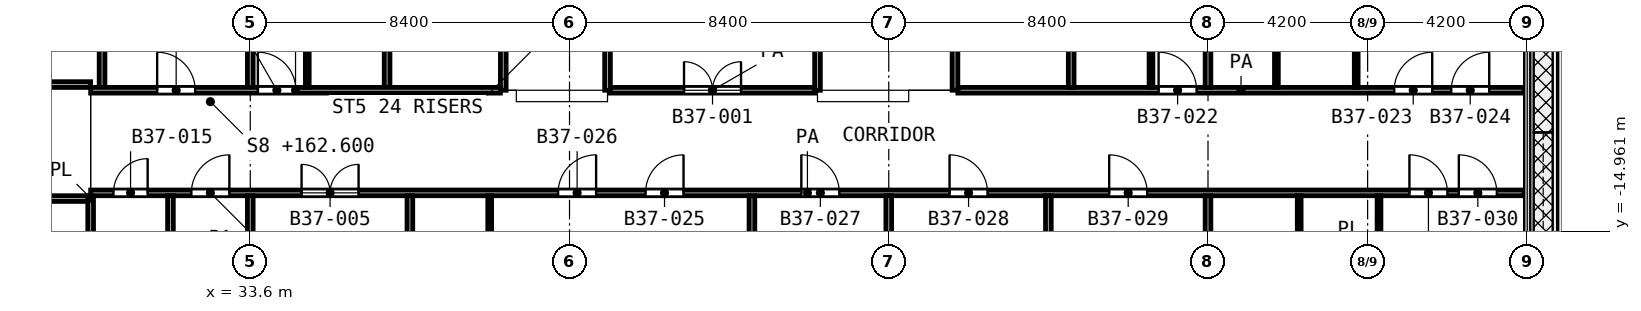
"""IFC4 building model, lengths in metres.
Left out: names, types, materials, properties, quantities, classifications, styles, units other than length and angle.
Written with IfcOpenShell. Run it as: python <this file> out.ifc"""

import sys

from ifc_helpers import new_model, si_unit, direction, frame, frame_2d, origin, place, context, subcontext, project, spatial, rectangle, extrude, element, fill, save


model = new_model("IFC4")
c1 = context("Model", 3, precision=1e-05, world=origin(), true_north=direction((0.0, 1.0)))
c2 = subcontext(c1, "Body", "Model", "MODEL_VIEW")
j1 = project(units=[si_unit("LENGTHUNIT", "METRE"), si_unit("PLANEANGLEUNIT", "RADIAN")], contexts=[c1])
p1 = place(None, origin())
s1 = spatial("IfcSite", under=j1, at=p1, CompositionType="ELEMENT")
p2 = place(p1, origin())
s2 = spatial("IfcBuilding", under=s1, at=p2, CompositionType="ELEMENT")
p3 = place(p2, frame((0.0, 0.0, 162.6)))
s3 = spatial("IfcBuildingStorey", under=s2, at=p3, CompositionType="ELEMENT", Elevation=162.6)
p4 = place(p3, frame((29.4, -14.147, 0.0), z_axis=(0.0, 0.0, 1.0), x_axis=(0.0, 1.0, 0.0)))
e1 = element("IfcWall", 1, at=p4, inside=s3, PredefinedType="PARTITIONING", context=c2, shape_type="SweptSolid", body=[
    extrude(rectangle(XDim=0.12, YDim=0.1, at=frame_2d((0.06, 0.0))), origin(), (0.0, 0.0, 1.0), 3.6),
])
for number, where, z_axis, x_axis in (
    (2, (35.1, -11.175, 0.0), (0.0, 0.0, 1.0), (0.0, 1.0, 0.0)),
    (3, (39.9, -17.25, 0.0), (0.0, 0.0, 1.0), (0.0, 1.0, 0.0)),
    (4, (57.3, -11.175, 0.0), (0.0, 0.0, 1.0), (0.0, 1.0, 0.0)),
):
    element("IfcWall", number, at=place(p3, frame(where, z_axis=z_axis, x_axis=x_axis)), inside=s3, PredefinedType="PARTITIONING", context=c2, shape_type="SweptSolid", body=[
        extrude(rectangle(XDim=3.225, YDim=0.1, at=frame_2d((1.613, 0.0))), origin(), (0.0, 0.0, 1.0), 3.6),
    ])
for number, where, z_axis, x_axis in (
    (5, (60.6, -11.175, 0.0), (0.0, 0.0, 1.0), (0.0, 1.0, 0.0)),
    (6, (61.2, -17.248, 0.0), (0.0, 0.0, 1.0), (0.0, 1.0, 0.0)),
    (7, (62.7, -11.175, 0.0), (0.0, 0.0, 1.0), (0.0, 1.0, 0.0)),
):
    element("IfcWall", number, at=place(p3, frame(where, z_axis=z_axis, x_axis=x_axis)), inside=s3, PredefinedType="PARTITIONING", context=c2, shape_type="SweptSolid", body=[
        extrude(rectangle(XDim=3.223, YDim=0.1, at=frame_2d((1.612, 0.0))), origin(), (0.0, 0.0, 1.0), 3.6),
    ])
p5 = place(p3, frame((63.3, -17.249, 0.0), z_axis=(0.0, 0.0, 1.0), x_axis=(0.0, 1.0, 0.0)))
e8 = element("IfcWall", 8, at=p5, inside=s3, PredefinedType="PARTITIONING", context=c2, shape_type="SweptSolid", body=[
    extrude(rectangle(XDim=3.224, YDim=0.1, at=frame_2d((1.612, 0.0))), origin(), (0.0, 0.0, 1.0), 3.6),
])
p6 = place(p3, frame((24.9, -14.1, 0.0), z_axis=(0.0, 0.0, 1.0), x_axis=(1.0, 0.0, 0.0)))
e9 = element("IfcWall", 9, at=p6, inside=s3, PredefinedType="PARTITIONING", context=c2, shape_type="SweptSolid", body=[
    extrude(rectangle(XDim=4.425, YDim=0.15, at=frame_2d((2.212, 0.0))), origin(), (0.0, 0.0, 1.0), 3.6),
])
p7 = place(p6, frame((1.9, 0.0, 0.0)))
e10 = element("IfcOpeningElement", 10, at=p7, cuts=e9, PredefinedType="OPENING", context=c2, shape_type="SweptSolid", body=[
    extrude(rectangle(XDim=1.0, YDim=2.1, at=frame_2d((0.5, 1.05))), frame((0.0, 0.085, 0.0), z_axis=(0.0, -1.0, 0.0), x_axis=(1.0, 0.0, 0.0)), (0.0, 0.0, 1.0), 0.17),
])
p8 = place(p3, frame((29.4, -13.95, 0.0), z_axis=(0.0, 0.0, 1.0), x_axis=(1.0, 0.0, 0.0)))
e11 = element("IfcWall", 11, at=p8, inside=s3, PredefinedType="PARTITIONING", context=c2, shape_type="SweptSolid", body=[
    extrude(rectangle(XDim=37.72, YDim=0.15, at=frame_2d((18.86, 0.0))), origin(), (0.0, 0.0, 1.0), 3.6),
])
p9 = place(p8, frame((14.6, 0.0, 0.0)))
e12 = element("IfcOpeningElement", 12, at=p9, cuts=e11, PredefinedType="OPENING", context=c2, shape_type="SweptSolid", body=[
    extrude(rectangle(XDim=1.0, YDim=2.1, at=frame_2d((0.5, 1.05))), frame((0.0, 0.085, 0.0), z_axis=(0.0, -1.0, 0.0), x_axis=(1.0, 0.0, 0.0)), (0.0, 0.0, 1.0), 0.17),
])
p10 = place(p8, frame((12.3, 0.0, 0.0)))
e13 = element("IfcOpeningElement", 13, at=p10, cuts=e11, PredefinedType="OPENING", context=c2, shape_type="SweptSolid", body=[
    extrude(rectangle(XDim=1.0, YDim=2.1, at=frame_2d((0.5, 1.05))), frame((0.0, 0.085, 0.0), z_axis=(0.0, -1.0, 0.0), x_axis=(1.0, 0.0, 0.0)), (0.0, 0.0, 1.0), 0.17),
])
p11 = place(p8, frame((18.7, 0.0, 0.0)))
e14 = element("IfcOpeningElement", 14, at=p11, cuts=e11, PredefinedType="OPENING", context=c2, shape_type="SweptSolid", body=[
    extrude(rectangle(XDim=1.0, YDim=2.1, at=frame_2d((0.5, 1.05))), frame((0.0, 0.085, 0.0), z_axis=(0.0, -1.0, 0.0), x_axis=(1.0, 0.0, 0.0)), (0.0, 0.0, 1.0), 0.17),
])
p12 = place(p8, frame((22.6, 0.0, 0.0)))
e15 = element("IfcOpeningElement", 15, at=p12, cuts=e11, PredefinedType="OPENING", context=c2, shape_type="SweptSolid", body=[
    extrude(rectangle(XDim=1.0, YDim=2.1, at=frame_2d((0.5, 1.05))), frame((0.0, 0.085, 0.0), z_axis=(0.0, -1.0, 0.0), x_axis=(1.0, 0.0, 0.0)), (0.0, 0.0, 1.0), 0.17),
])
p13 = place(p8, frame((26.8, 0.0, 0.0)))
e16 = element("IfcOpeningElement", 16, at=p13, cuts=e11, PredefinedType="OPENING", context=c2, shape_type="SweptSolid", body=[
    extrude(rectangle(XDim=1.0, YDim=2.1, at=frame_2d((0.5, 1.05))), frame((0.0, 0.085, 0.0), z_axis=(0.0, -1.0, 0.0), x_axis=(1.0, 0.0, 0.0)), (0.0, 0.0, 1.0), 0.17),
])
p14 = place(p8, frame((36.0, 0.0, 0.0)))
e17 = element("IfcOpeningElement", 17, at=p14, cuts=e11, PredefinedType="OPENING", context=c2, shape_type="SweptSolid", body=[
    extrude(rectangle(XDim=1.0, YDim=2.1, at=frame_2d((0.5, 1.05))), frame((0.0, 0.085, 0.0), z_axis=(0.0, -1.0, 0.0), x_axis=(1.0, 0.0, 0.0)), (0.0, 0.0, 1.0), 0.17),
])
p15 = place(p8, frame((34.7, 0.0, 0.0)))
e18 = element("IfcOpeningElement", 18, at=p15, cuts=e11, PredefinedType="OPENING", context=c2, shape_type="SweptSolid", body=[
    extrude(rectangle(XDim=1.0, YDim=2.1, at=frame_2d((0.5, 1.05))), frame((0.0, 0.085, 0.0), z_axis=(0.0, -1.0, 0.0), x_axis=(1.0, 0.0, 0.0)), (0.0, 0.0, 1.0), 0.17),
])
p16 = place(p8, frame((0.6, 0.0, 0.0)))
e19 = element("IfcOpeningElement", 19, at=p16, cuts=e11, PredefinedType="OPENING", context=c2, shape_type="SweptSolid", body=[
    extrude(rectangle(XDim=0.9, YDim=2.1, at=frame_2d((0.45, 1.05))), frame((0.0, 0.085, 0.0), z_axis=(0.0, -1.0, 0.0), x_axis=(1.0, 0.0, 0.0)), (0.0, 0.0, 1.0), 0.17),
])
p17 = place(p8, frame((2.65, 0.0, 0.0)))
e20 = element("IfcOpeningElement", 20, at=p17, cuts=e11, PredefinedType="OPENING", context=c2, shape_type="SweptSolid", body=[
    extrude(rectangle(XDim=1.0, YDim=2.1, at=frame_2d((0.5, 1.05))), frame((0.0, 0.085, 0.0), z_axis=(0.0, -1.0, 0.0), x_axis=(1.0, 0.0, 0.0)), (0.0, 0.0, 1.0), 0.17),
])
p18 = place(p8, frame((5.55, 0.0, 0.0)))
e21 = element("IfcOpeningElement", 21, at=p18, cuts=e11, PredefinedType="OPENING", context=c2, shape_type="SweptSolid", body=[
    extrude(rectangle(XDim=1.5, YDim=2.1, at=frame_2d((0.75, 1.05))), frame((0.0, 0.085, 0.0), z_axis=(0.0, -1.0, 0.0), x_axis=(1.0, 0.0, 0.0)), (0.0, 0.0, 1.0), 0.17),
])
p19 = place(p3, frame((29.4, -11.25, 0.0), z_axis=(0.0, 0.0, 1.0), x_axis=(1.0, 0.0, 0.0)))
e22 = element("IfcWall", 22, at=p19, inside=s3, PredefinedType="PARTITIONING", context=c2, shape_type="SweptSolid", body=[
    extrude(rectangle(XDim=10.782, YDim=0.15, at=frame_2d((5.391, 0.0))), origin(), (0.0, 0.0, 1.0), 3.6),
])
p20 = place(p19, frame((1.75, 0.0, 0.0)))
e23 = element("IfcOpeningElement", 23, at=p20, cuts=e22, PredefinedType="OPENING", context=c2, shape_type="SweptSolid", body=[
    extrude(rectangle(XDim=1.0, YDim=2.1, at=frame_2d((0.5, 1.05))), frame((0.0, 0.085, 0.0), z_axis=(0.0, -1.0, 0.0), x_axis=(1.0, 0.0, 0.0)), (0.0, 0.0, 1.0), 0.17),
])
p21 = place(p19, frame((4.4, 0.0, 0.0)))
e24 = element("IfcOpeningElement", 24, at=p21, cuts=e22, PredefinedType="OPENING", context=c2, shape_type="SweptSolid", body=[
    extrude(rectangle(XDim=1.0, YDim=2.1, at=frame_2d((0.5, 1.05))), frame((0.0, 0.085, 0.0), z_axis=(0.0, -1.0, 0.0), x_axis=(1.0, 0.0, 0.0)), (0.0, 0.0, 1.0), 0.17),
])
p22 = place(p3, frame((43.075, -11.25, 0.0), z_axis=(0.0, 0.0, 1.0), x_axis=(1.0, 0.0, 0.0)))
e25 = element("IfcWall", 25, at=p22, inside=s3, PredefinedType="PARTITIONING", context=c2, shape_type="SweptSolid", body=[
    extrude(rectangle(XDim=5.375, YDim=0.15, at=frame_2d((2.688, 0.0))), origin(), (0.0, 0.0, 1.0), 3.6),
])
p23 = place(p22, frame((1.938, 0.0, 0.0)))
e26 = element("IfcOpeningElement", 26, at=p23, cuts=e25, PredefinedType="OPENING", context=c2, shape_type="SweptSolid", body=[
    extrude(rectangle(XDim=1.5, YDim=2.1, at=frame_2d((0.75, 1.05))), frame((0.0, 0.085, 0.0), z_axis=(0.0, -1.0, 0.0), x_axis=(1.0, 0.0, 0.0)), (0.0, 0.0, 1.0), 0.17),
])
p24 = place(p3, frame((52.218, -11.25, 0.0), z_axis=(0.0, 0.0, 1.0), x_axis=(1.0, 0.0, 0.0)))
e27 = element("IfcWall", 27, at=p24, inside=s3, PredefinedType="PARTITIONING", context=c2, shape_type="SweptSolid", body=[
    extrude(rectangle(XDim=14.902, YDim=0.15, at=frame_2d((7.451, 0.0))), origin(), (0.0, 0.0, 1.0), 3.6),
])
p25 = place(p24, frame((5.282, 0.0, 0.0)))
e28 = element("IfcOpeningElement", 28, at=p25, cuts=e27, PredefinedType="OPENING", context=c2, shape_type="SweptSolid", body=[
    extrude(rectangle(XDim=1.0, YDim=2.1, at=frame_2d((0.5, 1.05))), frame((0.0, 0.085, 0.0), z_axis=(0.0, -1.0, 0.0), x_axis=(1.0, 0.0, 0.0)), (0.0, 0.0, 1.0), 0.17),
])
p26 = place(p24, frame((11.482, 0.0, 0.0)))
e29 = element("IfcOpeningElement", 29, at=p26, cuts=e27, PredefinedType="OPENING", context=c2, shape_type="SweptSolid", body=[
    extrude(rectangle(XDim=1.0, YDim=2.1, at=frame_2d((0.5, 1.05))), frame((0.0, 0.085, 0.0), z_axis=(0.0, -1.0, 0.0), x_axis=(1.0, 0.0, 0.0)), (0.0, 0.0, 1.0), 0.17),
])
p27 = place(p24, frame((12.982, 0.0, 0.0)))
e30 = element("IfcOpeningElement", 30, at=p27, cuts=e27, PredefinedType="OPENING", context=c2, shape_type="SweptSolid", body=[
    extrude(rectangle(XDim=1.0, YDim=2.1, at=frame_2d((0.5, 1.05))), frame((0.0, 0.085, 0.0), z_axis=(0.0, -1.0, 0.0), x_axis=(1.0, 0.0, 0.0)), (0.0, 0.0, 1.0), 0.17),
])
p28 = place(p3, frame((24.9, -11.1, 0.0), z_axis=(0.0, 0.0, 1.0), x_axis=(1.0, 0.0, 0.0)))
e31 = element("IfcWall", 31, at=p28, inside=s3, PredefinedType="PARTITIONING", context=c2, shape_type="SweptSolid", body=[
    extrude(rectangle(XDim=4.498, YDim=0.15, at=frame_2d((2.249, 0.0))), origin(), (0.0, 0.0, 1.0), 3.6),
])
p29 = place(p28, frame((1.799, 0.0, 0.0)))
e32 = element("IfcOpeningElement", 32, at=p29, cuts=e31, PredefinedType="OPENING", context=c2, shape_type="SweptSolid", body=[
    extrude(rectangle(XDim=1.2, YDim=2.1, at=frame_2d((0.6, 1.05))), frame((0.0, 0.085, 0.0), z_axis=(0.0, -1.0, 0.0), x_axis=(1.0, 0.0, 0.0)), (0.0, 0.0, 1.0), 0.17),
])
p30 = place(p3, frame((29.4, -31.198, 0.0), z_axis=(0.0, 0.0, 1.0), x_axis=(0.0, 1.0, 0.0)))
e33 = element("IfcWall", 33, at=p30, inside=s3, PredefinedType="PARTITIONING", context=c2, shape_type="SweptSolid", body=[
    extrude(rectangle(XDim=17.098, YDim=0.15, at=frame_2d((8.549, 0.0))), origin(), (0.0, 0.0, 1.0), 3.6),
])
p31 = place(p3, frame((29.7, -11.175, 0.0), z_axis=(0.0, 0.0, 1.0), x_axis=(0.0, 1.0, 0.0)))
e34 = element("IfcWall", 34, at=p31, inside=s3, PredefinedType="PARTITIONING", context=c2, shape_type="SweptSolid", body=[
    extrude(rectangle(XDim=11.095, YDim=0.15, at=frame_2d((5.547, 0.0))), origin(), (0.0, 0.0, 1.0), 2.7),
])
p32 = place(p3, frame((31.5, -24.698, 0.0), z_axis=(0.0, 0.0, 1.0), x_axis=(0.0, 1.0, 0.0)))
e35 = element("IfcWall", 35, at=p32, inside=s3, PredefinedType="PARTITIONING", context=c2, shape_type="SweptSolid", body=[
    extrude(rectangle(XDim=10.673, YDim=0.15, at=frame_2d((5.336, 0.0))), origin(), (0.0, 0.0, 1.0), 3.6),
])
p33 = place(p3, frame((33.6, -16.3, 0.0), z_axis=(0.0, 0.0, 1.0), x_axis=(0.0, 1.0, 0.0)))
e36 = element("IfcWall", 36, at=p33, inside=s3, PredefinedType="PARTITIONING", context=c2, shape_type="SweptSolid", body=[
    extrude(rectangle(XDim=2.275, YDim=0.15, at=frame_2d((1.138, 0.0))), origin(), (0.0, 0.0, 1.0), 3.6),
])
p34 = place(p3, frame((33.6, -11.175, 0.0), z_axis=(0.0, 0.0, 1.0), x_axis=(0.0, 1.0, 0.0)))
e37 = element("IfcWall", 37, at=p34, inside=s3, PredefinedType="PARTITIONING", context=c2, shape_type="SweptSolid", body=[
    extrude(rectangle(XDim=11.095, YDim=0.15, at=frame_2d((5.547, 0.0))), origin(), (0.0, 0.0, 1.0), 3.6),
])
p35 = place(p3, frame((37.2, -11.175, 0.0), z_axis=(0.0, 0.0, 1.0), x_axis=(0.0, 1.0, 0.0)))
e38 = element("IfcWall", 38, at=p35, inside=s3, PredefinedType="PARTITIONING", context=c2, shape_type="SweptSolid", body=[
    extrude(rectangle(XDim=11.095, YDim=0.15, at=frame_2d((5.547, 0.0))), origin(), (0.0, 0.0, 1.0), 2.7),
])
p36 = place(p3, frame((37.8, -31.12, 0.0), z_axis=(0.0, 0.0, 1.0), x_axis=(0.0, 1.0, 0.0)))
e39 = element("IfcWall", 39, at=p36, inside=s3, PredefinedType="PARTITIONING", context=c2, shape_type="SweptSolid", body=[
    extrude(rectangle(XDim=17.095, YDim=0.15, at=frame_2d((8.548, 0.0))), origin(), (0.0, 0.0, 1.0), 3.6),
])
p37 = place(p3, frame((40.257, -11.25, 0.0), z_axis=(0.0, 0.0, 1.0), x_axis=(0.0, 1.0, 0.0)))
e40 = element("IfcWall", 40, at=p37, inside=s3, PredefinedType="PARTITIONING", context=c2, shape_type="SweptSolid", body=[
    extrude(rectangle(XDim=11.17, YDim=0.15, at=frame_2d((5.585, 0.0))), origin(), (0.0, 0.0, 1.0), 2.7),
])
p38 = place(p37, frame((5.125, 0.0, 0.0)))
e41 = element("IfcOpeningElement", 41, at=p38, cuts=e40, PredefinedType="OPENING", context=c2, shape_type="SweptSolid", body=[
    extrude(rectangle(XDim=1.0, YDim=2.1, at=frame_2d((0.5, 1.05))), frame((0.0, 0.085, 0.0), z_axis=(0.0, -1.0, 0.0), x_axis=(1.0, 0.0, 0.0)), (0.0, 0.0, 1.0), 0.17),
])
p39 = place(p3, frame((43.0, -11.25, 0.0), z_axis=(0.0, 0.0, 1.0), x_axis=(0.0, 1.0, 0.0)))
e42 = element("IfcWall", 42, at=p39, inside=s3, PredefinedType="PARTITIONING", context=c2, shape_type="SweptSolid", body=[
    extrude(rectangle(XDim=2.35, YDim=0.15, at=frame_2d((1.175, 0.0))), origin(), (0.0, 0.0, 1.0), 3.6),
])
p40 = place(p3, frame((46.8, -16.72, 0.0), z_axis=(0.0, 0.0, 1.0), x_axis=(0.0, 1.0, 0.0)))
e43 = element("IfcWall", 43, at=p40, inside=s3, PredefinedType="PARTITIONING", context=c2, shape_type="SweptSolid", body=[
    extrude(rectangle(XDim=2.695, YDim=0.15, at=frame_2d((1.348, 0.0))), origin(), (0.0, 0.0, 1.0), 3.6),
])
p41 = place(p3, frame((48.525, -11.25, 0.0), z_axis=(0.0, 0.0, 1.0), x_axis=(0.0, 1.0, 0.0)))
e44 = element("IfcWall", 44, at=p41, inside=s3, PredefinedType="PARTITIONING", context=c2, shape_type="SweptSolid", body=[
    extrude(rectangle(XDim=2.6, YDim=0.15, at=frame_2d((1.3, 0.0))), origin(), (0.0, 0.0, 1.0), 3.6),
])
p42 = place(p3, frame((50.4, -16.72, 0.0), z_axis=(0.0, 0.0, 1.0), x_axis=(0.0, 1.0, 0.0)))
e45 = element("IfcWall", 45, at=p42, inside=s3, PredefinedType="PARTITIONING", context=c2, shape_type="SweptSolid", body=[
    extrude(rectangle(XDim=2.695, YDim=0.15, at=frame_2d((1.348, 0.0))), origin(), (0.0, 0.0, 1.0), 3.6),
])
p43 = place(p3, frame((52.143, -11.25, 0.0), z_axis=(0.0, 0.0, 1.0), x_axis=(0.0, 1.0, 0.0)))
e46 = element("IfcWall", 46, at=p43, inside=s3, PredefinedType="PARTITIONING", context=c2, shape_type="SweptSolid", body=[
    extrude(rectangle(XDim=9.397, YDim=0.15, at=frame_2d((4.698, 0.0))), origin(), (0.0, 0.0, 1.0), 3.6),
])
p44 = place(p43, frame((4.199, 0.0, 0.0)))
e47 = element("IfcOpeningElement", 47, at=p44, cuts=e46, PredefinedType="OPENING", context=c2, shape_type="SweptSolid", body=[
    extrude(rectangle(XDim=1.0, YDim=2.1, at=frame_2d((0.5, 1.05))), frame((0.0, 0.085, 0.0), z_axis=(0.0, -1.0, 0.0), x_axis=(1.0, 0.0, 0.0)), (0.0, 0.0, 1.0), 0.17),
])
p45 = place(p3, frame((54.6, -16.72, 0.0), z_axis=(0.0, 0.0, 1.0), x_axis=(0.0, 1.0, 0.0)))
e48 = element("IfcWall", 48, at=p45, inside=s3, PredefinedType="PARTITIONING", context=c2, shape_type="SweptSolid", body=[
    extrude(rectangle(XDim=2.695, YDim=0.15, at=frame_2d((1.348, 0.0))), origin(), (0.0, 0.0, 1.0), 3.6),
])
p46 = place(p3, frame((55.2, -11.175, 0.0), z_axis=(0.0, 0.0, 1.0), x_axis=(0.0, 1.0, 0.0)))
e49 = element("IfcWall", 49, at=p46, inside=s3, PredefinedType="PARTITIONING", context=c2, shape_type="SweptSolid", body=[
    extrude(rectangle(XDim=11.095, YDim=0.15, at=frame_2d((5.547, 0.0))), origin(), (0.0, 0.0, 1.0), 2.7),
])
p47 = place(p3, frame((58.8, -16.72, 0.0), z_axis=(0.0, 0.0, 1.0), x_axis=(0.0, 1.0, 0.0)))
e50 = element("IfcWall", 50, at=p47, inside=s3, PredefinedType="PARTITIONING", context=c2, shape_type="SweptSolid", body=[
    extrude(rectangle(XDim=2.695, YDim=0.15, at=frame_2d((1.348, 0.0))), origin(), (0.0, 0.0, 1.0), 3.6),
])
p48 = place(p3, frame((58.8, -11.175, 0.0), z_axis=(0.0, 0.0, 1.0), x_axis=(0.0, 1.0, 0.0)))
e51 = element("IfcWall", 51, at=p48, inside=s3, PredefinedType="PARTITIONING", context=c2, shape_type="SweptSolid", body=[
    extrude(rectangle(XDim=11.095, YDim=0.15, at=frame_2d((5.547, 0.0))), origin(), (0.0, 0.0, 1.0), 2.7),
])
p49 = place(p20, origin())
e52 = element("IfcDoor", 52, at=p49, inside=s3, OperationType="SINGLE_SWING_LEFT", PredefinedType="DOOR", context=c2, shape_type="SweptSolid", body=[
    extrude(rectangle(XDim=1.0, YDim=2.1, at=frame_2d((0.5, 1.05))), frame((0.0, 0.025, 0.0), z_axis=(0.0, -1.0, 0.0), x_axis=(1.0, 0.0, 0.0)), (0.0, 0.0, 1.0), 0.05),
])
fill(e23, e52)
p50 = place(p21, origin())
e53 = element("IfcDoor", 53, at=p50, inside=s3, OperationType="SINGLE_SWING_LEFT", PredefinedType="DOOR", context=c2, shape_type="SweptSolid", body=[
    extrude(rectangle(XDim=1.0, YDim=2.1, at=frame_2d((0.5, 1.05))), frame((0.0, 0.025, 0.0), z_axis=(0.0, -1.0, 0.0), x_axis=(1.0, 0.0, 0.0)), (0.0, 0.0, 1.0), 0.05),
])
fill(e24, e53)
p51 = place(p23, origin())
e54 = element("IfcDoor", 54, at=p51, inside=s3, OperationType="DOUBLE_DOOR_SINGLE_SWING", PredefinedType="DOOR", context=c2, shape_type="SweptSolid", body=[
    extrude(rectangle(XDim=1.5, YDim=2.1, at=frame_2d((0.75, 1.05))), frame((0.0, 0.025, 0.0), z_axis=(0.0, -1.0, 0.0), x_axis=(1.0, 0.0, 0.0)), (0.0, 0.0, 1.0), 0.05),
])
fill(e26, e54)
p52 = place(p25, origin())
e55 = element("IfcDoor", 55, at=p52, inside=s3, OperationType="SINGLE_SWING_LEFT", PredefinedType="DOOR", context=c2, shape_type="SweptSolid", body=[
    extrude(rectangle(XDim=1.0, YDim=2.1, at=frame_2d((0.5, 1.05))), frame((0.0, 0.025, 0.0), z_axis=(0.0, -1.0, 0.0), x_axis=(1.0, 0.0, 0.0)), (0.0, 0.0, 1.0), 0.05),
])
fill(e28, e55)
p53 = place(p26, origin())
e56 = element("IfcDoor", 56, at=p53, inside=s3, OperationType="SINGLE_SWING_RIGHT", PredefinedType="DOOR", context=c2, shape_type="SweptSolid", body=[
    extrude(rectangle(XDim=1.0, YDim=2.1, at=frame_2d((0.5, 1.05))), frame((0.0, 0.025, 0.0), z_axis=(0.0, -1.0, 0.0), x_axis=(1.0, 0.0, 0.0)), (0.0, 0.0, 1.0), 0.05),
])
fill(e29, e56)
p54 = place(p27, origin())
e57 = element("IfcDoor", 57, at=p54, inside=s3, OperationType="SINGLE_SWING_RIGHT", PredefinedType="DOOR", context=c2, shape_type="SweptSolid", body=[
    extrude(rectangle(XDim=1.0, YDim=2.1, at=frame_2d((0.5, 1.05))), frame((0.0, 0.025, 0.0), z_axis=(0.0, -1.0, 0.0), x_axis=(1.0, 0.0, 0.0)), (0.0, 0.0, 1.0), 0.05),
])
fill(e30, e57)
p55 = place(p9, origin())
e58 = element("IfcDoor", 58, at=p55, inside=s3, OperationType="SINGLE_SWING_RIGHT", PredefinedType="DOOR", context=c2, shape_type="SweptSolid", body=[
    extrude(rectangle(XDim=1.0, YDim=2.1, at=frame_2d((0.5, 1.05))), frame((0.0, 0.025, 0.0), z_axis=(0.0, -1.0, 0.0), x_axis=(1.0, 0.0, 0.0)), (0.0, 0.0, 1.0), 0.05),
])
fill(e12, e58)
p56 = place(p10, origin())
e59 = element("IfcDoor", 59, at=p56, inside=s3, OperationType="SINGLE_SWING_RIGHT", PredefinedType="DOOR", context=c2, shape_type="SweptSolid", body=[
    extrude(rectangle(XDim=1.0, YDim=2.1, at=frame_2d((0.5, 1.05))), frame((0.0, 0.025, 0.0), z_axis=(0.0, -1.0, 0.0), x_axis=(1.0, 0.0, 0.0)), (0.0, 0.0, 1.0), 0.05),
])
fill(e13, e59)
p57 = place(p11, origin())
e60 = element("IfcDoor", 60, at=p57, inside=s3, OperationType="SINGLE_SWING_LEFT", PredefinedType="DOOR", context=c2, shape_type="SweptSolid", body=[
    extrude(rectangle(XDim=1.0, YDim=2.1, at=frame_2d((0.5, 1.05))), frame((0.0, 0.025, 0.0), z_axis=(0.0, -1.0, 0.0), x_axis=(1.0, 0.0, 0.0)), (0.0, 0.0, 1.0), 0.05),
])
fill(e14, e60)
p58 = place(p12, origin())
e61 = element("IfcDoor", 61, at=p58, inside=s3, OperationType="SINGLE_SWING_LEFT", PredefinedType="DOOR", context=c2, shape_type="SweptSolid", body=[
    extrude(rectangle(XDim=1.0, YDim=2.1, at=frame_2d((0.5, 1.05))), frame((0.0, 0.025, 0.0), z_axis=(0.0, -1.0, 0.0), x_axis=(1.0, 0.0, 0.0)), (0.0, 0.0, 1.0), 0.05),
])
fill(e15, e61)
p59 = place(p13, origin())
e62 = element("IfcDoor", 62, at=p59, inside=s3, OperationType="SINGLE_SWING_LEFT", PredefinedType="DOOR", context=c2, shape_type="SweptSolid", body=[
    extrude(rectangle(XDim=1.0, YDim=2.1, at=frame_2d((0.5, 1.05))), frame((0.0, 0.025, 0.0), z_axis=(0.0, -1.0, 0.0), x_axis=(1.0, 0.0, 0.0)), (0.0, 0.0, 1.0), 0.05),
])
fill(e16, e62)
p60 = place(p14, origin())
e63 = element("IfcDoor", 63, at=p60, inside=s3, OperationType="SINGLE_SWING_LEFT", PredefinedType="DOOR", context=c2, shape_type="SweptSolid", body=[
    extrude(rectangle(XDim=1.0, YDim=2.1, at=frame_2d((0.5, 1.05))), frame((0.0, 0.025, 0.0), z_axis=(0.0, -1.0, 0.0), x_axis=(1.0, 0.0, 0.0)), (0.0, 0.0, 1.0), 0.05),
])
fill(e17, e63)
p61 = place(p15, origin())
e64 = element("IfcDoor", 64, at=p61, inside=s3, OperationType="SINGLE_SWING_LEFT", PredefinedType="DOOR", context=c2, shape_type="SweptSolid", body=[
    extrude(rectangle(XDim=1.0, YDim=2.1, at=frame_2d((0.5, 1.05))), frame((0.0, 0.025, 0.0), z_axis=(0.0, -1.0, 0.0), x_axis=(1.0, 0.0, 0.0)), (0.0, 0.0, 1.0), 0.05),
])
fill(e18, e64)
p62 = place(p16, origin())
e65 = element("IfcDoor", 65, at=p62, inside=s3, OperationType="SINGLE_SWING_RIGHT", PredefinedType="DOOR", context=c2, shape_type="SweptSolid", body=[
    extrude(rectangle(XDim=0.9, YDim=2.1, at=frame_2d((0.45, 1.05))), frame((0.0, 0.025, 0.0), z_axis=(0.0, -1.0, 0.0), x_axis=(1.0, 0.0, 0.0)), (0.0, 0.0, 1.0), 0.05),
])
fill(e19, e65)
p63 = place(p17, origin())
e66 = element("IfcDoor", 66, at=p63, inside=s3, OperationType="SINGLE_SWING_RIGHT", PredefinedType="DOOR", context=c2, shape_type="SweptSolid", body=[
    extrude(rectangle(XDim=1.0, YDim=2.1, at=frame_2d((0.5, 1.05))), frame((0.0, 0.025, 0.0), z_axis=(0.0, -1.0, 0.0), x_axis=(1.0, 0.0, 0.0)), (0.0, 0.0, 1.0), 0.05),
])
fill(e20, e66)
p64 = place(p18, origin())
e67 = element("IfcDoor", 67, at=p64, inside=s3, OperationType="DOUBLE_DOOR_SINGLE_SWING", PredefinedType="DOOR", context=c2, shape_type="SweptSolid", body=[
    extrude(rectangle(XDim=1.5, YDim=2.1, at=frame_2d((0.75, 1.05))), frame((0.0, 0.025, 0.0), z_axis=(0.0, -1.0, 0.0), x_axis=(1.0, 0.0, 0.0)), (0.0, 0.0, 1.0), 0.05),
])
fill(e21, e67)
save(model, sys.argv[1])
